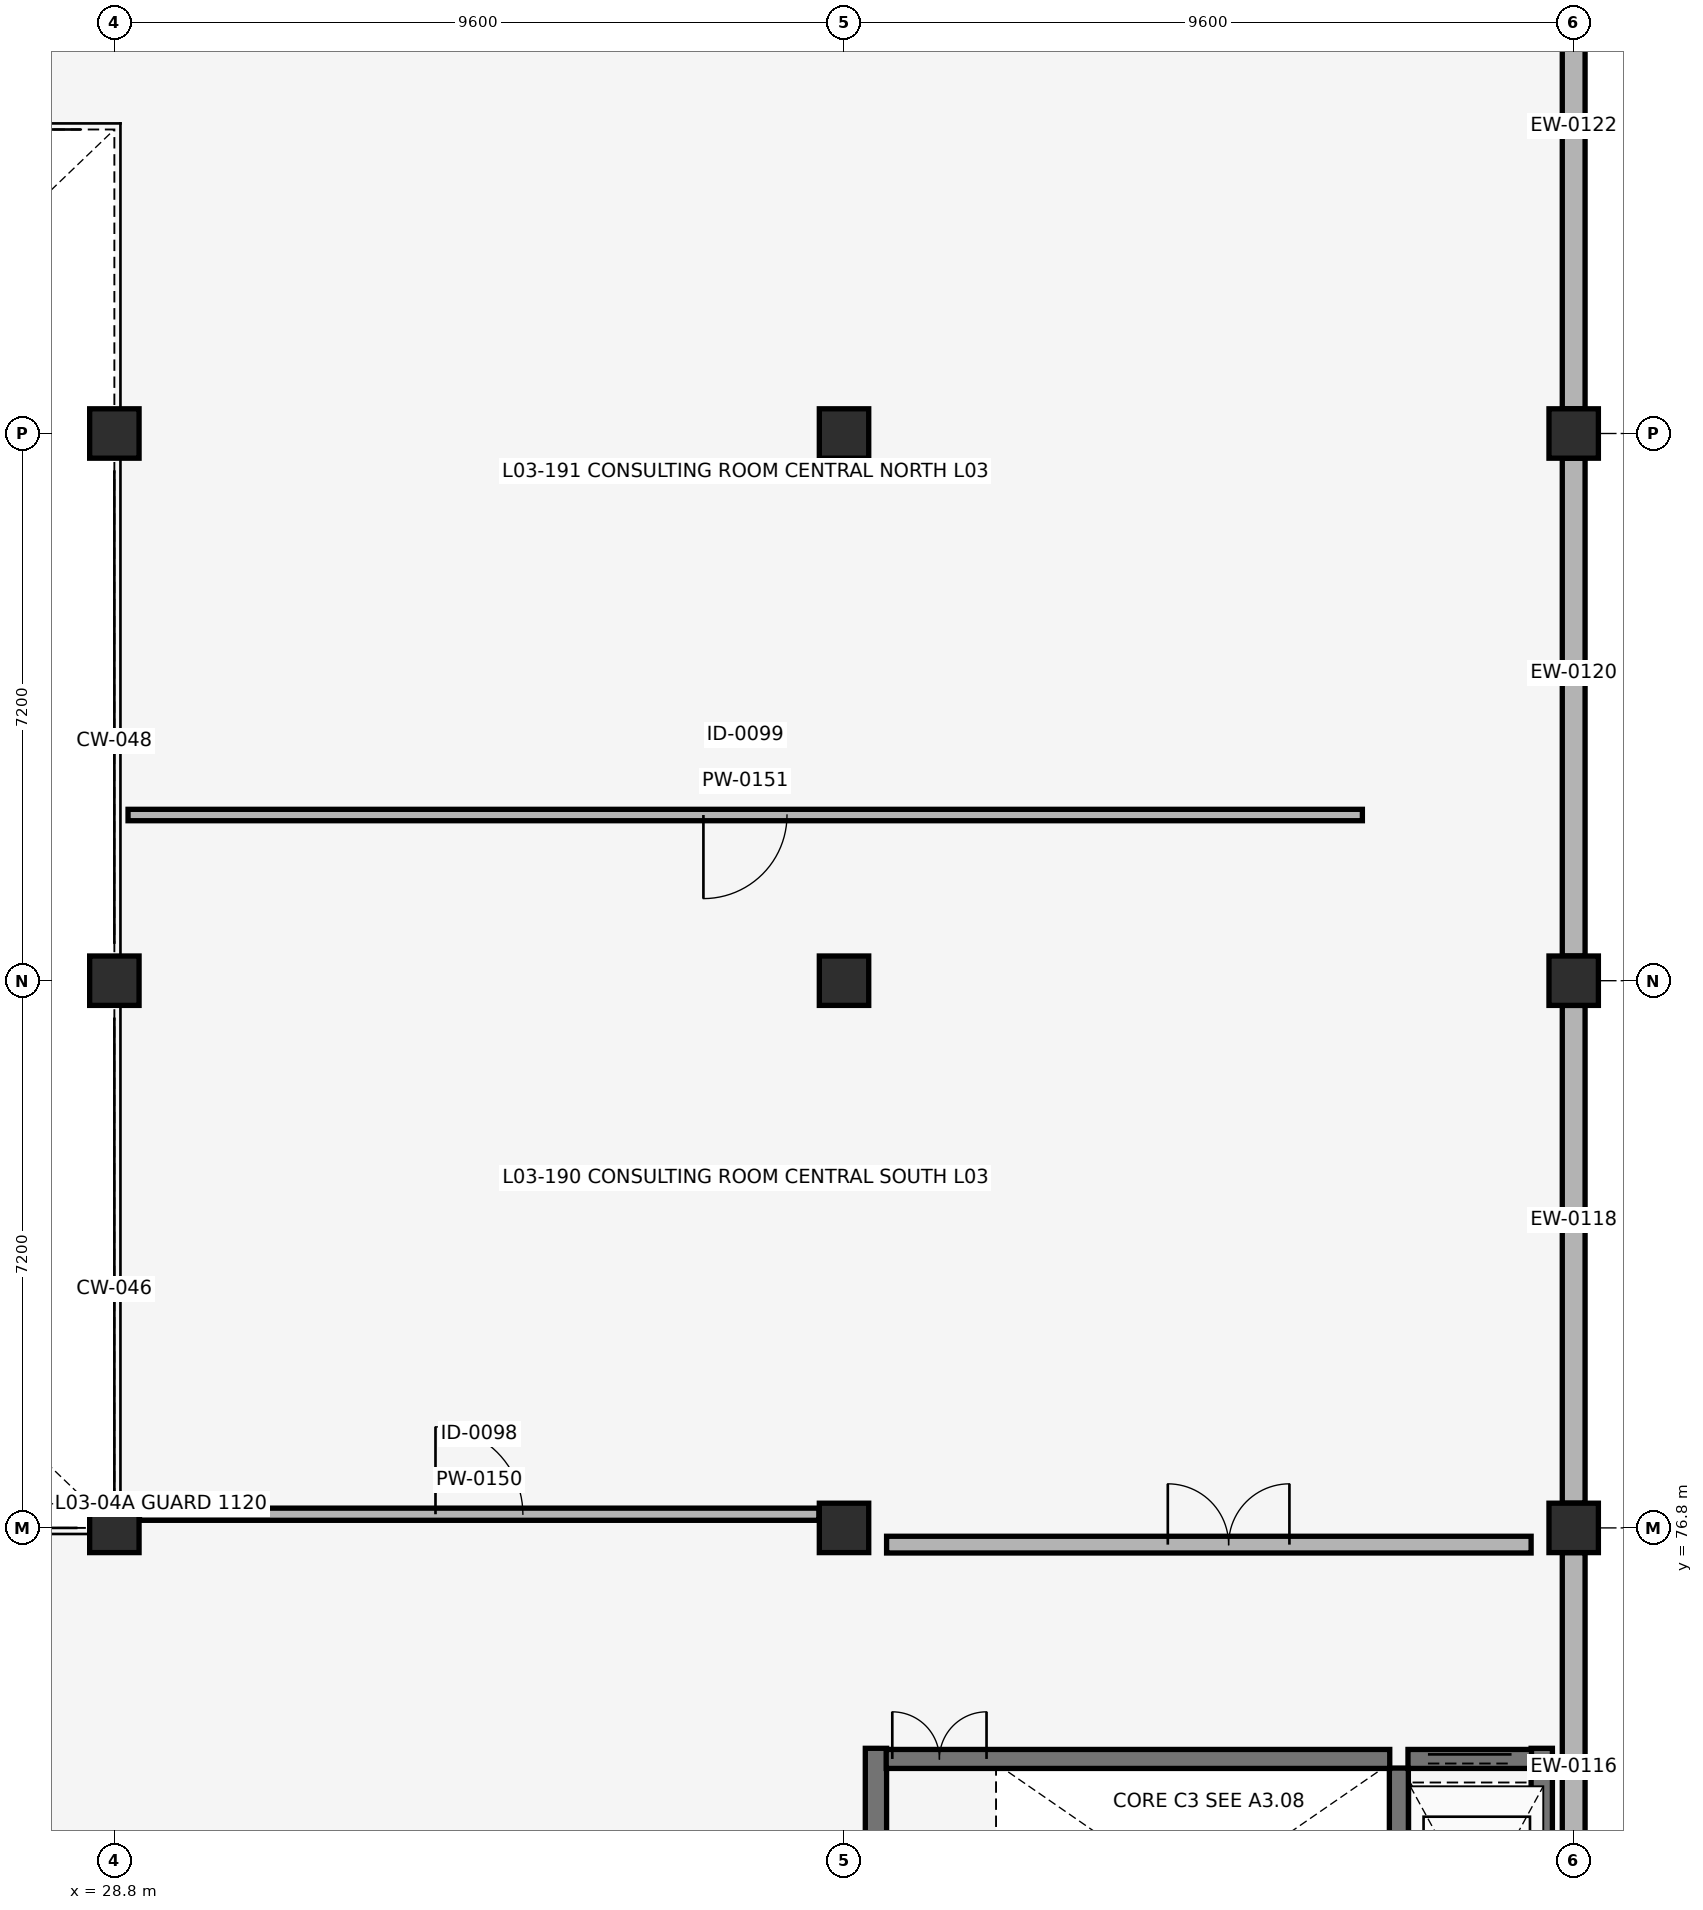
"""IFC4 building model, lengths in metres.
Left out: names, types, materials, properties, quantities, classifications, styles, units other than length and angle.
Written with IfcOpenShell. Run it as: python <this file> out.ifc"""

import sys

from ifc_helpers import new_model, si_unit, direction, frame, frame_2d, origin, origin_2d, place, context, subcontext, project, spatial, rectangle, extrude, element, fill, save


model = new_model("IFC4")
c1 = context("Model", 3, precision=1e-05, world=origin(), true_north=direction((0.0, 1.0)))
c2 = subcontext(c1, "Body", "Model", "MODEL_VIEW")
j1 = project(units=[si_unit("LENGTHUNIT", "METRE"), si_unit("PLANEANGLEUNIT", "RADIAN")], contexts=[c1])
p1 = place(None, origin())
s1 = spatial("IfcSite", under=j1, at=p1, CompositionType="ELEMENT")
p2 = place(p1, origin())
s2 = spatial("IfcBuilding", under=s1, at=p2, CompositionType="ELEMENT")
p3 = place(p2, frame((0.0, 0.0, 12.58)))
s3 = spatial("IfcBuildingStorey", under=s2, at=p3, CompositionType="ELEMENT", Elevation=12.58)
for number, where, z_axis, x_axis in (
    (1, (28.8, 76.8, 0.0), (0.0, 0.0, 1.0), (1.0, 0.0, 0.0)),
    (2, (28.8, 84.0, 0.0), (0.0, 0.0, 1.0), (1.0, 0.0, 0.0)),
    (3, (28.8, 91.2, 0.0), (0.0, 0.0, 1.0), (1.0, 0.0, 0.0)),
    (4, (38.4, 76.8, 0.0), (0.0, 0.0, 1.0), (1.0, 0.0, 0.0)),
    (5, (38.4, 84.0, 0.0), (0.0, 0.0, 1.0), (1.0, 0.0, 0.0)),
    (6, (38.4, 91.2, 0.0), (0.0, 0.0, 1.0), (1.0, 0.0, 0.0)),
    (7, (48.0, 76.8, 0.0), (0.0, 0.0, 1.0), (1.0, 0.0, 0.0)),
    (8, (48.0, 84.0, 0.0), (0.0, 0.0, 1.0), (1.0, 0.0, 0.0)),
    (9, (48.0, 91.2, 0.0), (0.0, 0.0, 1.0), (1.0, 0.0, 0.0)),
):
    element("IfcColumn", number, at=place(p3, frame(where, z_axis=z_axis, x_axis=x_axis)), inside=s3, PredefinedType="COLUMN", context=c2, shape_type="SweptSolid", body=[
        extrude(rectangle(XDim=0.65, YDim=0.65, at=origin_2d()), origin(), (0.0, 0.0, 1.0), 4.08),
    ])
for number, where, z_axis, x_axis in (
    (10, (48.0, 69.925, 0.0), (0.0, 0.0, 1.0), (0.0, 1.0, 0.0)),
    (11, (48.0, 77.125, 0.0), (0.0, 0.0, 1.0), (0.0, 1.0, 0.0)),
    (12, (48.0, 84.325, 0.0), (0.0, 0.0, 1.0), (0.0, 1.0, 0.0)),
    (13, (48.0, 91.525, 0.0), (0.0, 0.0, 1.0), (0.0, 1.0, 0.0)),
):
    element("IfcWall", number, at=place(p3, frame(where, z_axis=z_axis, x_axis=x_axis)), inside=s3, PredefinedType="SOLIDWALL", context=c2, shape_type="SweptSolid", body=[
        extrude(rectangle(XDim=6.55, YDim=0.3, at=frame_2d((3.275, 0.0))), origin(), (0.0, 0.0, 1.0), 3.08),
    ])
for number, where, z_axis, x_axis in (
    (14, (38.82, 69.82, 0.0), (0.0, 0.0, 1.0), (0.0, 1.0, 0.0)),
    (15, (47.58, 69.82, 0.0), (0.0, 0.0, 1.0), (0.0, 1.0, 0.0)),
):
    element("IfcWall", number, at=place(p3, frame(where, z_axis=z_axis, x_axis=x_axis)), inside=s3, PredefinedType="SHEAR", context=c2, shape_type="SweptSolid", body=[
        extrude(rectangle(XDim=4.08, YDim=0.28, at=frame_2d((2.04, 0.0))), origin(), (0.0, 0.0, 1.0), 3.8),
    ])
p4 = place(p3, frame((45.7, 70.1, 0.0), z_axis=(0.0, 0.0, 1.0), x_axis=(0.0, 1.0, 0.0)))
e16 = element("IfcWall", 16, at=p4, inside=s3, PredefinedType="SHEAR", context=c2, shape_type="SweptSolid", body=[
    extrude(rectangle(XDim=3.54, YDim=0.25, at=frame_2d((1.77, 0.0))), origin(), (0.0, 0.0, 1.0), 3.8),
])
p5 = place(p3, frame((38.955, 73.76, 0.0), z_axis=(0.0, 0.0, 1.0), x_axis=(1.0, 0.0, 0.0)))
e17 = element("IfcWall", 17, at=p5, inside=s3, PredefinedType="SHEAR", context=c2, shape_type="SweptSolid", body=[
    extrude(rectangle(XDim=6.625, YDim=0.25, at=frame_2d((3.312, 0.0))), origin(), (0.0, 0.0, 1.0), 3.8),
])
p6 = place(p5, frame((0.08, 0.0, 0.0)))
e18 = element("IfcOpeningElement", 18, at=p6, cuts=e17, PredefinedType="OPENING", context=c2, shape_type="SweptSolid", body=[
    extrude(rectangle(XDim=1.24, YDim=2.15, at=frame_2d((0.62, 1.075))), frame((0.0, 0.135, 0.0), z_axis=(0.0, -1.0, 0.0), x_axis=(1.0, 0.0, 0.0)), (0.0, 0.0, 1.0), 0.27),
])
p7 = place(p3, frame((38.96, 76.58, 0.0), z_axis=(0.0, 0.0, 1.0), x_axis=(1.0, 0.0, 0.0)))
e19 = element("IfcWall", 19, at=p7, inside=s3, PredefinedType="PARTITIONING", context=c2, shape_type="SweptSolid", body=[
    extrude(rectangle(XDim=8.48, YDim=0.22, at=frame_2d((4.24, 0.0))), origin(), (0.0, 0.0, 1.0), 3.19),
])
p8 = place(p7, frame((3.7, 0.0, 0.0)))
e20 = element("IfcOpeningElement", 20, at=p8, cuts=e19, PredefinedType="OPENING", context=c2, shape_type="SweptSolid", body=[
    extrude(rectangle(XDim=1.6, YDim=2.2, at=frame_2d((0.8, 1.1))), frame((0.0, 0.12, 0.0), z_axis=(0.0, -1.0, 0.0), x_axis=(1.0, 0.0, 0.0)), (0.0, 0.0, 1.0), 0.24),
])
p9 = place(p3, frame((45.82, 73.76, 0.0), z_axis=(0.0, 0.0, 1.0), x_axis=(1.0, 0.0, 0.0)))
e21 = element("IfcWall", 21, at=p9, inside=s3, PredefinedType="SHEAR", context=c2, shape_type="SweptSolid", body=[
    extrude(rectangle(XDim=1.625, YDim=0.25, at=frame_2d((0.812, 0.0))), origin(), (0.0, 0.0, 1.0), 3.8),
])
p10 = place(p9, frame((0.262, 0.0, 0.0)))
e22 = element("IfcOpeningElement", 22, at=p10, cuts=e21, PredefinedType="OPENING", context=c2, shape_type="SweptSolid", body=[
    extrude(rectangle(XDim=1.1, YDim=2.15, at=frame_2d((0.55, 1.075))), frame((0.0, 0.135, 0.0), z_axis=(0.0, -1.0, 0.0), x_axis=(1.0, 0.0, 0.0)), (0.0, 0.0, 1.0), 0.27),
])
p11 = place(p3, frame((29.13, 76.98, 0.0), z_axis=(0.0, 0.0, 1.0), x_axis=(1.0, 0.0, 0.0)))
e23 = element("IfcWall", 23, at=p11, inside=s3, PredefinedType="PARTITIONING", context=c2, shape_type="SweptSolid", body=[
    extrude(rectangle(XDim=8.94, YDim=0.16, at=frame_2d((4.47, 0.0))), origin(), (0.0, 0.0, 1.0), 3.05),
])
p12 = place(p11, frame((3.895, 0.0, 0.0)))
e24 = element("IfcOpeningElement", 24, at=p12, cuts=e23, PredefinedType="OPENING", context=c2, shape_type="SweptSolid", body=[
    extrude(rectangle(XDim=1.15, YDim=2.1, at=frame_2d((0.575, 1.05))), frame((0.0, 0.09, 0.0), z_axis=(0.0, -1.0, 0.0), x_axis=(1.0, 0.0, 0.0)), (0.0, 0.0, 1.0), 0.18),
])
p13 = place(p3, frame((28.98, 86.18, 0.0), z_axis=(0.0, 0.0, 1.0), x_axis=(1.0, 0.0, 0.0)))
e25 = element("IfcWall", 25, at=p13, inside=s3, PredefinedType="PARTITIONING", context=c2, shape_type="SweptSolid", body=[
    extrude(rectangle(XDim=16.24, YDim=0.15, at=frame_2d((8.12, 0.0))), origin(), (0.0, 0.0, 1.0), 3.08),
])
p14 = place(p13, frame((7.57, 0.0, 0.0)))
e26 = element("IfcOpeningElement", 26, at=p14, cuts=e25, PredefinedType="OPENING", context=c2, shape_type="SweptSolid", body=[
    extrude(rectangle(XDim=1.1, YDim=2.1, at=frame_2d((0.55, 1.05))), frame((0.0, 0.085, 0.0), z_axis=(0.0, -1.0, 0.0), x_axis=(1.0, 0.0, 0.0)), (0.0, 0.0, 1.0), 0.17),
])
p15 = place(p6, origin())
e27 = element("IfcDoor", 27, at=p15, inside=s3, OperationType="DOUBLE_DOOR_SINGLE_SWING", PredefinedType="DOOR", context=c2, shape_type="SweptSolid", body=[
    extrude(rectangle(XDim=1.24, YDim=2.15, at=frame_2d((0.62, 1.075))), frame((0.0, 0.025, 0.0), z_axis=(0.0, -1.0, 0.0), x_axis=(1.0, 0.0, 0.0)), (0.0, 0.0, 1.0), 0.05),
])
fill(e18, e27)
p16 = place(p8, origin())
e28 = element("IfcDoor", 28, at=p16, inside=s3, OperationType="DOUBLE_DOOR_SINGLE_SWING", PredefinedType="DOOR", context=c2, shape_type="SweptSolid", body=[
    extrude(rectangle(XDim=1.6, YDim=2.2, at=frame_2d((0.8, 1.1))), frame((0.0, 0.025, 0.0), z_axis=(0.0, -1.0, 0.0), x_axis=(1.0, 0.0, 0.0)), (0.0, 0.0, 1.0), 0.05),
])
fill(e20, e28)
p17 = place(p10, origin())
e29 = element("IfcDoor", 29, at=p17, inside=s3, OperationType="DOUBLE_DOOR_SLIDING", PredefinedType="DOOR", context=c2, shape_type="SweptSolid", body=[
    extrude(rectangle(XDim=1.1, YDim=2.15, at=frame_2d((0.55, 1.075))), frame((0.0, 0.025, 0.0), z_axis=(0.0, -1.0, 0.0), x_axis=(1.0, 0.0, 0.0)), (0.0, 0.0, 1.0), 0.05),
])
fill(e22, e29)
p18 = place(p12, origin())
e30 = element("IfcDoor", 30, at=p18, inside=s3, OperationType="SINGLE_SWING_LEFT", PredefinedType="DOOR", context=c2, shape_type="SweptSolid", body=[
    extrude(rectangle(XDim=1.15, YDim=2.1, at=frame_2d((0.575, 1.05))), frame((0.0, 0.025, 0.0), z_axis=(0.0, -1.0, 0.0), x_axis=(1.0, 0.0, 0.0)), (0.0, 0.0, 1.0), 0.05),
])
fill(e24, e30)
p19 = place(p14, origin())
e31 = element("IfcDoor", 31, at=p19, inside=s3, OperationType="SINGLE_SWING_RIGHT", PredefinedType="DOOR", context=c2, shape_type="SweptSolid", body=[
    extrude(rectangle(XDim=1.1, YDim=2.1, at=frame_2d((0.55, 1.05))), frame((0.0, 0.025, 0.0), z_axis=(0.0, -1.0, 0.0), x_axis=(1.0, 0.0, 0.0)), (0.0, 0.0, 1.0), 0.05),
])
fill(e26, e31)
save(model, sys.argv[1])
